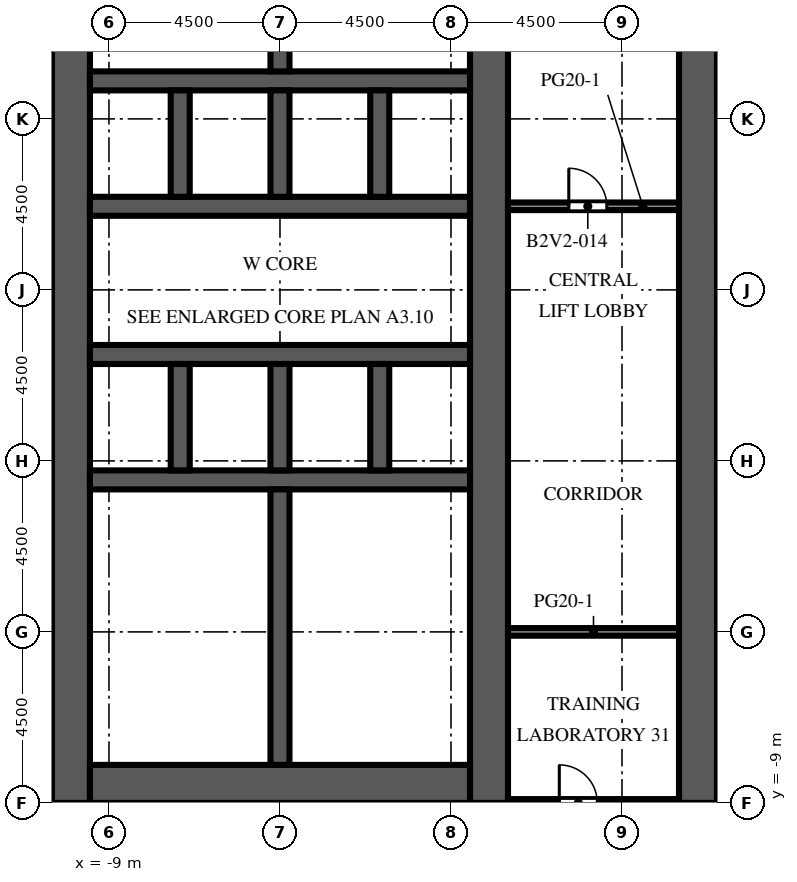
"""IFC4 building model, lengths in metres.
Left out: names, types, materials, properties, quantities, classifications, styles, units other than length and angle.
Written with IfcOpenShell. Run it as: python <this file> out.ifc"""

import sys

from ifc_helpers import new_model, si_unit, direction, frame, frame_2d, origin, place, context, subcontext, project, spatial, rectangle, extrude, element, fill, save


model = new_model("IFC4")
c1 = context("Model", 3, precision=1e-05, world=origin(), true_north=direction((0.0, 1.0)))
c2 = subcontext(c1, "Body", "Model", "MODEL_VIEW")
j1 = project(units=[si_unit("LENGTHUNIT", "METRE"), si_unit("PLANEANGLEUNIT", "RADIAN")], contexts=[c1])
p1 = place(None, origin())
s1 = spatial("IfcSite", under=j1, at=p1, CompositionType="ELEMENT")
p2 = place(p1, origin())
s2 = spatial("IfcBuilding", under=s1, at=p2, CompositionType="ELEMENT")
p3 = place(p2, frame((0.0, 0.0, 62.4)))
s3 = spatial("IfcBuildingStorey", under=s2, at=p3, CompositionType="ELEMENT", Elevation=62.4)
p4 = place(p3, frame((-10.0, -9.0, 0.0), z_axis=(0.0, 0.0, 1.0), x_axis=(0.0, 1.0, 0.0)))
e1 = element("IfcWall", 1, at=p4, inside=s3, PredefinedType="SHEAR", context=c2, shape_type="SweptSolid", body=[
    extrude(rectangle(XDim=27.5, YDim=1.0, at=frame_2d((13.75, 0.0))), origin(), (0.0, 0.0, 1.0), 4.1),
])
p5 = place(p4, frame((12.55, 0.0, 0.0)))
e2 = element("IfcOpeningElement", 2, at=p5, cuts=e1, PredefinedType="OPENING", context=c2, shape_type="SweptSolid", body=[
    extrude(rectangle(XDim=2.4, YDim=2.4, at=frame_2d((1.2, 1.2))), frame((0.0, 0.51, 0.0), z_axis=(0.0, -1.0, 0.0), x_axis=(1.0, 0.0, 0.0)), (0.0, 0.0, 1.0), 1.02),
])
p6 = place(p4, frame((6.825, 0.0, 0.0)))
e3 = element("IfcOpeningElement", 3, at=p6, cuts=e1, PredefinedType="OPENING", context=c2, shape_type="SweptSolid", body=[
    extrude(rectangle(XDim=1.2, YDim=2.1, at=frame_2d((0.6, 1.05))), frame((0.0, 0.51, 0.0), z_axis=(0.0, -1.0, 0.0), x_axis=(1.0, 0.0, 0.0)), (0.0, 0.0, 1.0), 1.02),
])
p7 = place(p4, frame((19.475, 0.0, 0.0)))
e4 = element("IfcOpeningElement", 4, at=p7, cuts=e1, PredefinedType="OPENING", context=c2, shape_type="SweptSolid", body=[
    extrude(rectangle(XDim=1.2, YDim=2.1, at=frame_2d((0.6, 1.05))), frame((0.0, 0.51, 0.0), z_axis=(0.0, -1.0, 0.0), x_axis=(1.0, 0.0, 0.0)), (0.0, 0.0, 1.0), 1.02),
])
p8 = place(p3, frame((1.0, -9.0, 0.0), z_axis=(0.0, 0.0, 1.0), x_axis=(0.0, 1.0, 0.0)))
e5 = element("IfcWall", 5, at=p8, inside=s3, PredefinedType="SHEAR", context=c2, shape_type="SweptSolid", body=[
    extrude(rectangle(XDim=27.5, YDim=1.0, at=frame_2d((13.75, 0.0))), origin(), (0.0, 0.0, 1.0), 4.1),
])
p9 = place(p8, frame((12.55, 0.0, 0.0)))
e6 = element("IfcOpeningElement", 6, at=p9, cuts=e5, PredefinedType="OPENING", context=c2, shape_type="SweptSolid", body=[
    extrude(rectangle(XDim=2.4, YDim=2.4, at=frame_2d((1.2, 1.2))), frame((0.0, 0.51, 0.0), z_axis=(0.0, -1.0, 0.0), x_axis=(1.0, 0.0, 0.0)), (0.0, 0.0, 1.0), 1.02),
])
p10 = place(p8, frame((5.55, 0.0, 0.0)))
e7 = element("IfcOpeningElement", 7, at=p10, cuts=e5, PredefinedType="OPENING", context=c2, shape_type="SweptSolid", body=[
    extrude(rectangle(XDim=0.905, YDim=2.1, at=frame_2d((0.453, 1.05))), frame((0.0, 0.51, 0.0), z_axis=(0.0, -1.0, 0.0), x_axis=(1.0, 0.0, 0.0)), (0.0, 0.0, 1.0), 1.02),
])
p11 = place(p8, frame((23.363, 0.0, 0.0)))
e8 = element("IfcOpeningElement", 8, at=p11, cuts=e5, PredefinedType="OPENING", context=c2, shape_type="SweptSolid", body=[
    extrude(rectangle(XDim=1.2, YDim=2.1, at=frame_2d((0.6, 1.05))), frame((0.0, 0.51, 0.0), z_axis=(0.0, -1.0, 0.0), x_axis=(1.0, 0.0, 0.0)), (0.0, 0.0, 1.0), 1.02),
])
p12 = place(p3, frame((-9.5, -8.5, 0.0), z_axis=(0.0, 0.0, 1.0), x_axis=(1.0, 0.0, 0.0)))
e9 = element("IfcWall", 9, at=p12, inside=s3, PredefinedType="SHEAR", context=c2, shape_type="SweptSolid", body=[
    extrude(rectangle(XDim=10.0, YDim=1.0, at=frame_2d((5.0, 0.0))), origin(), (0.0, 0.0, 1.0), 4.1),
])
p13 = place(p3, frame((-9.5, -0.5, 0.0), z_axis=(0.0, 0.0, 1.0), x_axis=(1.0, 0.0, 0.0)))
e10 = element("IfcWall", 10, at=p13, inside=s3, PredefinedType="SHEAR", context=c2, shape_type="SweptSolid", body=[
    extrude(rectangle(XDim=10.0, YDim=0.5, at=frame_2d((5.0, 0.0))), origin(), (0.0, 0.0, 1.0), 4.1),
])
p14 = place(p3, frame((-9.5, 2.8, 0.0), z_axis=(0.0, 0.0, 1.0), x_axis=(1.0, 0.0, 0.0)))
e11 = element("IfcWall", 11, at=p14, inside=s3, PredefinedType="SHEAR", context=c2, shape_type="SweptSolid", body=[
    extrude(rectangle(XDim=10.0, YDim=0.5, at=frame_2d((5.0, 0.0))), origin(), (0.0, 0.0, 1.0), 4.1),
])
p15 = place(p14, frame((0.512, 0.0, 0.0)))
e12 = element("IfcOpeningElement", 12, at=p15, cuts=e11, PredefinedType="OPENING", context=c2, shape_type="SweptSolid", body=[
    extrude(rectangle(XDim=1.1, YDim=2.1, at=frame_2d((0.55, 1.05))), frame((0.0, 0.26, 0.0), z_axis=(0.0, -1.0, 0.0), x_axis=(1.0, 0.0, 0.0)), (0.0, 0.0, 1.0), 0.52),
])
p16 = place(p14, frame((3.137, 0.0, 0.0)))
e13 = element("IfcOpeningElement", 13, at=p16, cuts=e11, PredefinedType="OPENING", context=c2, shape_type="SweptSolid", body=[
    extrude(rectangle(XDim=1.1, YDim=2.1, at=frame_2d((0.55, 1.05))), frame((0.0, 0.26, 0.0), z_axis=(0.0, -1.0, 0.0), x_axis=(1.0, 0.0, 0.0)), (0.0, 0.0, 1.0), 0.52),
])
p17 = place(p14, frame((8.387, 0.0, 0.0)))
e14 = element("IfcOpeningElement", 14, at=p17, cuts=e11, PredefinedType="OPENING", context=c2, shape_type="SweptSolid", body=[
    extrude(rectangle(XDim=1.1, YDim=2.1, at=frame_2d((0.55, 1.05))), frame((0.0, 0.26, 0.0), z_axis=(0.0, -1.0, 0.0), x_axis=(1.0, 0.0, 0.0)), (0.0, 0.0, 1.0), 0.52),
])
p18 = place(p3, frame((-9.5, 6.7, 0.0), z_axis=(0.0, 0.0, 1.0), x_axis=(1.0, 0.0, 0.0)))
e15 = element("IfcWall", 15, at=p18, inside=s3, PredefinedType="SHEAR", context=c2, shape_type="SweptSolid", body=[
    extrude(rectangle(XDim=10.0, YDim=0.5, at=frame_2d((5.0, 0.0))), origin(), (0.0, 0.0, 1.0), 4.1),
])
p19 = place(p18, frame((0.512, 0.0, 0.0)))
e16 = element("IfcOpeningElement", 16, at=p19, cuts=e15, PredefinedType="OPENING", context=c2, shape_type="SweptSolid", body=[
    extrude(rectangle(XDim=1.1, YDim=2.1, at=frame_2d((0.55, 1.05))), frame((0.0, 0.26, 0.0), z_axis=(0.0, -1.0, 0.0), x_axis=(1.0, 0.0, 0.0)), (0.0, 0.0, 1.0), 0.52),
])
p20 = place(p18, frame((3.188, 0.0, 0.0)))
e17 = element("IfcOpeningElement", 17, at=p20, cuts=e15, PredefinedType="OPENING", context=c2, shape_type="SweptSolid", body=[
    extrude(rectangle(XDim=1.0, YDim=2.1, at=frame_2d((0.5, 1.05))), frame((0.0, 0.26, 0.0), z_axis=(0.0, -1.0, 0.0), x_axis=(1.0, 0.0, 0.0)), (0.0, 0.0, 1.0), 0.52),
])
p21 = place(p18, frame((5.812, 0.0, 0.0)))
e18 = element("IfcOpeningElement", 18, at=p21, cuts=e15, PredefinedType="OPENING", context=c2, shape_type="SweptSolid", body=[
    extrude(rectangle(XDim=1.0, YDim=2.1, at=frame_2d((0.5, 1.05))), frame((0.0, 0.26, 0.0), z_axis=(0.0, -1.0, 0.0), x_axis=(1.0, 0.0, 0.0)), (0.0, 0.0, 1.0), 0.52),
])
p22 = place(p18, frame((8.438, 0.0, 0.0)))
e19 = element("IfcOpeningElement", 19, at=p22, cuts=e15, PredefinedType="OPENING", context=c2, shape_type="SweptSolid", body=[
    extrude(rectangle(XDim=1.0, YDim=2.1, at=frame_2d((0.5, 1.05))), frame((0.0, 0.26, 0.0), z_axis=(0.0, -1.0, 0.0), x_axis=(1.0, 0.0, 0.0)), (0.0, 0.0, 1.0), 0.52),
])
p23 = place(p3, frame((-9.5, 10.0, 0.0), z_axis=(0.0, 0.0, 1.0), x_axis=(1.0, 0.0, 0.0)))
e20 = element("IfcWall", 20, at=p23, inside=s3, PredefinedType="SHEAR", context=c2, shape_type="SweptSolid", body=[
    extrude(rectangle(XDim=10.0, YDim=0.5, at=frame_2d((5.0, 0.0))), origin(), (0.0, 0.0, 1.0), 4.1),
])
for number, where, z_axis, x_axis in (
    (21, (-7.125, -0.25, 0.0), (0.0, 0.0, 1.0), (0.0, 1.0, 0.0)),
    (22, (-7.125, 6.95, 0.0), (0.0, 0.0, 1.0), (0.0, 1.0, 0.0)),
    (23, (-4.5, -0.25, 0.0), (0.0, 0.0, 1.0), (0.0, 1.0, 0.0)),
    (24, (-4.5, 6.95, 0.0), (0.0, 0.0, 1.0), (0.0, 1.0, 0.0)),
    (25, (-1.875, -0.25, 0.0), (0.0, 0.0, 1.0), (0.0, 1.0, 0.0)),
    (26, (-1.875, 6.95, 0.0), (0.0, 0.0, 1.0), (0.0, 1.0, 0.0)),
):
    element("IfcWall", number, at=place(p3, frame(where, z_axis=z_axis, x_axis=x_axis)), inside=s3, PredefinedType="SHEAR", context=c2, shape_type="SweptSolid", body=[
        extrude(rectangle(XDim=2.8, YDim=0.5, at=frame_2d((1.4, 0.0))), origin(), (0.0, 0.0, 1.0), 4.1),
    ])
for number, where, z_axis, x_axis in (
    (27, (-4.5, -8.0, 0.0), (0.0, 0.0, 1.0), (0.0, 1.0, 0.0)),
    (28, (-4.5, 10.25, 0.0), (0.0, 0.0, 1.0), (0.0, 1.0, 0.0)),
):
    element("IfcWall", number, at=place(p3, frame(where, z_axis=z_axis, x_axis=x_axis)), inside=s3, PredefinedType="SHEAR", context=c2, shape_type="SweptSolid", body=[
        extrude(rectangle(XDim=7.25, YDim=0.5, at=frame_2d((3.625, 0.0))), origin(), (0.0, 0.0, 1.0), 4.1),
    ])
p24 = place(p3, frame((6.5, -9.0, 0.0), z_axis=(0.0, 0.0, 1.0), x_axis=(0.0, 1.0, 0.0)))
e29 = element("IfcWall", 29, at=p24, inside=s3, PredefinedType="SHEAR", context=c2, shape_type="SweptSolid", body=[
    extrude(rectangle(XDim=27.5, YDim=1.0, at=frame_2d((13.75, 0.0))), origin(), (0.0, 0.0, 1.0), 4.1),
])
p25 = place(p24, frame((12.55, 0.0, 0.0)))
e30 = element("IfcOpeningElement", 30, at=p25, cuts=e29, PredefinedType="OPENING", context=c2, shape_type="SweptSolid", body=[
    extrude(rectangle(XDim=2.4, YDim=2.4, at=frame_2d((1.2, 1.2))), frame((0.0, 0.51, 0.0), z_axis=(0.0, -1.0, 0.0), x_axis=(1.0, 0.0, 0.0)), (0.0, 0.0, 1.0), 1.02),
])
p26 = place(p24, frame((5.55, 0.0, 0.0)))
e31 = element("IfcOpeningElement", 31, at=p26, cuts=e29, PredefinedType="OPENING", context=c2, shape_type="SweptSolid", body=[
    extrude(rectangle(XDim=0.905, YDim=2.1, at=frame_2d((0.453, 1.05))), frame((0.0, 0.51, 0.0), z_axis=(0.0, -1.0, 0.0), x_axis=(1.0, 0.0, 0.0)), (0.0, 0.0, 1.0), 1.02),
])
p27 = place(p24, frame((23.363, 0.0, 0.0)))
e32 = element("IfcOpeningElement", 32, at=p27, cuts=e29, PredefinedType="OPENING", context=c2, shape_type="SweptSolid", body=[
    extrude(rectangle(XDim=1.2, YDim=2.1, at=frame_2d((0.6, 1.05))), frame((0.0, 0.51, 0.0), z_axis=(0.0, -1.0, 0.0), x_axis=(1.0, 0.0, 0.0)), (0.0, 0.0, 1.0), 1.02),
])
p28 = place(p3, frame((-1.875, -3.65, 0.0), z_axis=(0.0, 0.0, 1.0), x_axis=(1.0, 0.0, 0.0)))
e33 = element("IfcWall", 33, at=p28, inside=s3, PredefinedType="PARTITIONING", context=c2, shape_type="SweptSolid", body=[
    extrude(rectangle(XDim=2.375, YDim=0.1, at=frame_2d((1.188, 0.0))), origin(), (0.0, 0.0, 1.0), 3.65),
])
p29 = place(p28, frame((0.688, 0.0, 0.0)))
e34 = element("IfcOpeningElement", 34, at=p29, cuts=e33, PredefinedType="OPENING", context=c2, shape_type="SweptSolid", body=[
    extrude(rectangle(XDim=1.0, YDim=2.1, at=frame_2d((0.5, 1.05))), frame((0.0, 0.06, 0.0), z_axis=(0.0, -1.0, 0.0), x_axis=(1.0, 0.0, 0.0)), (0.0, 0.0, 1.0), 0.12),
])
p30 = place(p3, frame((-4.25, -3.65, 0.0), z_axis=(0.0, 0.0, 1.0), x_axis=(1.0, 0.0, 0.0)))
e35 = element("IfcWall", 35, at=p30, inside=s3, PredefinedType="PARTITIONING", context=c2, shape_type="SweptSolid", body=[
    extrude(rectangle(XDim=2.375, YDim=0.1, at=frame_2d((1.188, 0.0))), origin(), (0.0, 0.0, 1.0), 3.65),
])
p31 = place(p30, frame((0.688, 0.0, 0.0)))
e36 = element("IfcOpeningElement", 36, at=p31, cuts=e35, PredefinedType="OPENING", context=c2, shape_type="SweptSolid", body=[
    extrude(rectangle(XDim=1.0, YDim=2.1, at=frame_2d((0.5, 1.05))), frame((0.0, 0.06, 0.0), z_axis=(0.0, -1.0, 0.0), x_axis=(1.0, 0.0, 0.0)), (0.0, 0.0, 1.0), 0.12),
])
p32 = place(p3, frame((-1.875, -2.345, 0.0), z_axis=(0.0, 0.0, 1.0), x_axis=(1.0, 0.0, 0.0)))
e37 = element("IfcWall", 37, at=p32, inside=s3, PredefinedType="PARTITIONING", context=c2, shape_type="SweptSolid", body=[
    extrude(rectangle(XDim=2.375, YDim=0.1, at=frame_2d((1.188, 0.0))), origin(), (0.0, 0.0, 1.0), 3.65),
])
p33 = place(p32, frame((0.688, 0.0, 0.0)))
e38 = element("IfcOpeningElement", 38, at=p33, cuts=e37, PredefinedType="OPENING", context=c2, shape_type="SweptSolid", body=[
    extrude(rectangle(XDim=1.0, YDim=2.1, at=frame_2d((0.5, 1.05))), frame((0.0, 0.06, 0.0), z_axis=(0.0, -1.0, 0.0), x_axis=(1.0, 0.0, 0.0)), (0.0, 0.0, 1.0), 0.12),
])
p34 = place(p3, frame((-4.25, -2.345, 0.0), z_axis=(0.0, 0.0, 1.0), x_axis=(1.0, 0.0, 0.0)))
e39 = element("IfcWall", 39, at=p34, inside=s3, PredefinedType="PARTITIONING", context=c2, shape_type="SweptSolid", body=[
    extrude(rectangle(XDim=2.375, YDim=0.1, at=frame_2d((1.188, 0.0))), origin(), (0.0, 0.0, 1.0), 3.65),
])
p35 = place(p34, frame((0.688, 0.0, 0.0)))
e40 = element("IfcOpeningElement", 40, at=p35, cuts=e39, PredefinedType="OPENING", context=c2, shape_type="SweptSolid", body=[
    extrude(rectangle(XDim=1.0, YDim=2.1, at=frame_2d((0.5, 1.05))), frame((0.0, 0.06, 0.0), z_axis=(0.0, -1.0, 0.0), x_axis=(1.0, 0.0, 0.0)), (0.0, 0.0, 1.0), 0.12),
])
p36 = place(p3, frame((-1.875, -8.0, 0.0), z_axis=(0.0, 0.0, 1.0), x_axis=(0.0, 1.0, 0.0)))
e41 = element("IfcWall", 41, at=p36, inside=s3, PredefinedType="PARTITIONING", context=c2, shape_type="SweptSolid", body=[
    extrude(rectangle(XDim=4.35, YDim=0.1, at=frame_2d((2.175, 0.0))), origin(), (0.0, 0.0, 1.0), 3.65),
])
p37 = place(p3, frame((-1.875, -2.345, 0.0), z_axis=(0.0, 0.0, 1.0), x_axis=(0.0, 1.0, 0.0)))
e42 = element("IfcWall", 42, at=p37, inside=s3, PredefinedType="PARTITIONING", context=c2, shape_type="SweptSolid", body=[
    extrude(rectangle(XDim=1.595, YDim=0.1, at=frame_2d((0.797, 0.0))), origin(), (0.0, 0.0, 1.0), 3.65),
])
p38 = place(p3, frame((1.5, -9.0, 0.0), z_axis=(0.0, 0.0, 1.0), x_axis=(1.0, 0.0, 0.0)))
e43 = element("IfcWall", 43, at=p38, inside=s3, PredefinedType="PARTITIONING", context=c2, shape_type="SweptSolid", body=[
    extrude(rectangle(XDim=4.5, YDim=0.2, at=frame_2d((2.25, 0.0))), origin(), (0.0, 0.0, 1.0), 3.65),
])
p39 = place(p38, frame((1.35, 0.0, 0.0)))
e44 = element("IfcOpeningElement", 44, at=p39, cuts=e43, PredefinedType="OPENING", context=c2, shape_type="SweptSolid", body=[
    extrude(rectangle(XDim=1.0, YDim=2.1, at=frame_2d((0.5, 1.05))), frame((0.0, 0.11, 0.0), z_axis=(0.0, -1.0, 0.0), x_axis=(1.0, 0.0, 0.0)), (0.0, 0.0, 1.0), 0.22),
])
p40 = place(p3, frame((1.5, -4.5, 0.0), z_axis=(0.0, 0.0, 1.0), x_axis=(1.0, 0.0, 0.0)))
e45 = element("IfcWall", 45, at=p40, inside=s3, PredefinedType="PARTITIONING", context=c2, shape_type="SweptSolid", body=[
    extrude(rectangle(XDim=4.5, YDim=0.2, at=frame_2d((2.25, 0.0))), origin(), (0.0, 0.0, 1.0), 3.65),
])
p41 = place(p3, frame((1.5, 6.7, 0.0), z_axis=(0.0, 0.0, 1.0), x_axis=(1.0, 0.0, 0.0)))
e46 = element("IfcWall", 46, at=p41, inside=s3, PredefinedType="PARTITIONING", context=c2, shape_type="SweptSolid", body=[
    extrude(rectangle(XDim=4.5, YDim=0.2, at=frame_2d((2.25, 0.0))), origin(), (0.0, 0.0, 1.0), 3.65),
])
p42 = place(p41, frame((1.6, 0.0, 0.0)))
e47 = element("IfcOpeningElement", 47, at=p42, cuts=e46, PredefinedType="OPENING", context=c2, shape_type="SweptSolid", body=[
    extrude(rectangle(XDim=1.0, YDim=2.1, at=frame_2d((0.5, 1.05))), frame((0.0, 0.11, 0.0), z_axis=(0.0, -1.0, 0.0), x_axis=(1.0, 0.0, 0.0)), (0.0, 0.0, 1.0), 0.22),
])
p43 = place(p15, origin())
e48 = element("IfcDoor", 48, at=p43, inside=s3, OperationType="DOUBLE_DOOR_SLIDING", PredefinedType="DOOR", context=c2, shape_type="SweptSolid", body=[
    extrude(rectangle(XDim=1.1, YDim=2.1, at=frame_2d((0.55, 1.05))), frame((0.0, 0.025, 0.0), z_axis=(0.0, -1.0, 0.0), x_axis=(1.0, 0.0, 0.0)), (0.0, 0.0, 1.0), 0.05),
])
fill(e12, e48)
p44 = place(p16, origin())
e49 = element("IfcDoor", 49, at=p44, inside=s3, OperationType="DOUBLE_DOOR_SLIDING", PredefinedType="DOOR", context=c2, shape_type="SweptSolid", body=[
    extrude(rectangle(XDim=1.1, YDim=2.1, at=frame_2d((0.55, 1.05))), frame((0.0, 0.025, 0.0), z_axis=(0.0, -1.0, 0.0), x_axis=(1.0, 0.0, 0.0)), (0.0, 0.0, 1.0), 0.05),
])
fill(e13, e49)
p45 = place(p17, origin())
e50 = element("IfcDoor", 50, at=p45, inside=s3, OperationType="DOUBLE_DOOR_SLIDING", PredefinedType="DOOR", context=c2, shape_type="SweptSolid", body=[
    extrude(rectangle(XDim=1.1, YDim=2.1, at=frame_2d((0.55, 1.05))), frame((0.0, 0.025, 0.0), z_axis=(0.0, -1.0, 0.0), x_axis=(1.0, 0.0, 0.0)), (0.0, 0.0, 1.0), 0.05),
])
fill(e14, e50)
p46 = place(p19, origin())
e51 = element("IfcDoor", 51, at=p46, inside=s3, OperationType="DOUBLE_DOOR_SLIDING", PredefinedType="DOOR", context=c2, shape_type="SweptSolid", body=[
    extrude(rectangle(XDim=1.1, YDim=2.1, at=frame_2d((0.55, 1.05))), frame((0.0, 0.025, 0.0), z_axis=(0.0, -1.0, 0.0), x_axis=(1.0, 0.0, 0.0)), (0.0, 0.0, 1.0), 0.05),
])
fill(e16, e51)
p47 = place(p5, origin())
e52 = element("IfcDoor", 52, at=p47, inside=s3, OperationType="DOUBLE_DOOR_DOUBLE_SWING", PredefinedType="DOOR", context=c2, shape_type="SweptSolid", body=[
    extrude(rectangle(XDim=2.4, YDim=2.4, at=frame_2d((1.2, 1.2))), frame((0.0, 0.025, 0.0), z_axis=(0.0, -1.0, 0.0), x_axis=(1.0, 0.0, 0.0)), (0.0, 0.0, 1.0), 0.05),
])
fill(e2, e52)
p48 = place(p9, origin())
e53 = element("IfcDoor", 53, at=p48, inside=s3, OperationType="DOUBLE_DOOR_DOUBLE_SWING", PredefinedType="DOOR", context=c2, shape_type="SweptSolid", body=[
    extrude(rectangle(XDim=2.4, YDim=2.4, at=frame_2d((1.2, 1.2))), frame((0.0, 0.025, 0.0), z_axis=(0.0, -1.0, 0.0), x_axis=(1.0, 0.0, 0.0)), (0.0, 0.0, 1.0), 0.05),
])
fill(e6, e53)
p49 = place(p25, origin())
e54 = element("IfcDoor", 54, at=p49, inside=s3, OperationType="DOUBLE_DOOR_DOUBLE_SWING", PredefinedType="DOOR", context=c2, shape_type="SweptSolid", body=[
    extrude(rectangle(XDim=2.4, YDim=2.4, at=frame_2d((1.2, 1.2))), frame((0.0, 0.025, 0.0), z_axis=(0.0, -1.0, 0.0), x_axis=(1.0, 0.0, 0.0)), (0.0, 0.0, 1.0), 0.05),
])
fill(e30, e54)
p50 = place(p6, origin())
e55 = element("IfcDoor", 55, at=p50, inside=s3, OperationType="SINGLE_SWING_LEFT", PredefinedType="DOOR", context=c2, shape_type="SweptSolid", body=[
    extrude(rectangle(XDim=1.2, YDim=2.1, at=frame_2d((0.6, 1.05))), frame((0.0, 0.025, 0.0), z_axis=(0.0, -1.0, 0.0), x_axis=(1.0, 0.0, 0.0)), (0.0, 0.0, 1.0), 0.05),
])
fill(e3, e55)
p51 = place(p7, origin())
e56 = element("IfcDoor", 56, at=p51, inside=s3, OperationType="SINGLE_SWING_LEFT", PredefinedType="DOOR", context=c2, shape_type="SweptSolid", body=[
    extrude(rectangle(XDim=1.2, YDim=2.1, at=frame_2d((0.6, 1.05))), frame((0.0, 0.025, 0.0), z_axis=(0.0, -1.0, 0.0), x_axis=(1.0, 0.0, 0.0)), (0.0, 0.0, 1.0), 0.05),
])
fill(e4, e56)
p52 = place(p20, origin())
e57 = element("IfcDoor", 57, at=p52, inside=s3, OperationType="SINGLE_SWING_RIGHT", PredefinedType="DOOR", context=c2, shape_type="SweptSolid", body=[
    extrude(rectangle(XDim=1.0, YDim=2.1, at=frame_2d((0.5, 1.05))), frame((0.0, 0.025, 0.0), z_axis=(0.0, -1.0, 0.0), x_axis=(1.0, 0.0, 0.0)), (0.0, 0.0, 1.0), 0.05),
])
fill(e17, e57)
p53 = place(p21, origin())
e58 = element("IfcDoor", 58, at=p53, inside=s3, OperationType="SINGLE_SWING_LEFT", PredefinedType="DOOR", context=c2, shape_type="SweptSolid", body=[
    extrude(rectangle(XDim=1.0, YDim=2.1, at=frame_2d((0.5, 1.05))), frame((0.0, 0.025, 0.0), z_axis=(0.0, -1.0, 0.0), x_axis=(1.0, 0.0, 0.0)), (0.0, 0.0, 1.0), 0.05),
])
fill(e18, e58)
p54 = place(p22, origin())
e59 = element("IfcDoor", 59, at=p54, inside=s3, OperationType="SINGLE_SWING_RIGHT", PredefinedType="DOOR", context=c2, shape_type="SweptSolid", body=[
    extrude(rectangle(XDim=1.0, YDim=2.1, at=frame_2d((0.5, 1.05))), frame((0.0, 0.025, 0.0), z_axis=(0.0, -1.0, 0.0), x_axis=(1.0, 0.0, 0.0)), (0.0, 0.0, 1.0), 0.05),
])
fill(e19, e59)
p55 = place(p10, origin())
e60 = element("IfcDoor", 60, at=p55, inside=s3, OperationType="SINGLE_SWING_LEFT", PredefinedType="DOOR", context=c2, shape_type="SweptSolid", body=[
    extrude(rectangle(XDim=0.905, YDim=2.1, at=frame_2d((0.453, 1.05))), frame((0.0, 0.475, 0.0), z_axis=(0.0, -1.0, 0.0), x_axis=(1.0, 0.0, 0.0)), (0.0, 0.0, 1.0), 0.05),
])
fill(e7, e60)
p56 = place(p29, origin())
e61 = element("IfcDoor", 61, at=p56, inside=s3, OperationType="SINGLE_SWING_RIGHT", PredefinedType="DOOR", context=c2, shape_type="SweptSolid", body=[
    extrude(rectangle(XDim=1.0, YDim=2.1, at=frame_2d((0.5, 1.05))), frame((0.0, 0.025, 0.0), z_axis=(0.0, -1.0, 0.0), x_axis=(1.0, 0.0, 0.0)), (0.0, 0.0, 1.0), 0.05),
])
fill(e34, e61)
p57 = place(p31, origin())
e62 = element("IfcDoor", 62, at=p57, inside=s3, OperationType="SINGLE_SWING_LEFT", PredefinedType="DOOR", context=c2, shape_type="SweptSolid", body=[
    extrude(rectangle(XDim=1.0, YDim=2.1, at=frame_2d((0.5, 1.05))), frame((0.0, 0.025, 0.0), z_axis=(0.0, -1.0, 0.0), x_axis=(1.0, 0.0, 0.0)), (0.0, 0.0, 1.0), 0.05),
])
fill(e36, e62)
p58 = place(p33, origin())
e63 = element("IfcDoor", 63, at=p58, inside=s3, OperationType="SINGLE_SWING_RIGHT", PredefinedType="DOOR", context=c2, shape_type="SweptSolid", body=[
    extrude(rectangle(XDim=1.0, YDim=2.1, at=frame_2d((0.5, 1.05))), frame((0.0, 0.025, 0.0), z_axis=(0.0, -1.0, 0.0), x_axis=(1.0, 0.0, 0.0)), (0.0, 0.0, 1.0), 0.05),
])
fill(e38, e63)
p59 = place(p35, origin())
e64 = element("IfcDoor", 64, at=p59, inside=s3, OperationType="SINGLE_SWING_LEFT", PredefinedType="DOOR", context=c2, shape_type="SweptSolid", body=[
    extrude(rectangle(XDim=1.0, YDim=2.1, at=frame_2d((0.5, 1.05))), frame((0.0, 0.025, 0.0), z_axis=(0.0, -1.0, 0.0), x_axis=(1.0, 0.0, 0.0)), (0.0, 0.0, 1.0), 0.05),
])
fill(e40, e64)
p60 = place(p26, origin())
e65 = element("IfcDoor", 65, at=p60, inside=s3, OperationType="SINGLE_SWING_RIGHT", PredefinedType="DOOR", context=c2, shape_type="SweptSolid", body=[
    extrude(rectangle(XDim=0.905, YDim=2.1, at=frame_2d((0.453, 1.05))), frame((0.0, -0.425, 0.0), z_axis=(0.0, -1.0, 0.0), x_axis=(1.0, 0.0, 0.0)), (0.0, 0.0, 1.0), 0.05),
])
fill(e31, e65)
p61 = place(p39, origin())
e66 = element("IfcDoor", 66, at=p61, inside=s3, OperationType="SINGLE_SWING_LEFT", PredefinedType="DOOR", context=c2, shape_type="SweptSolid", body=[
    extrude(rectangle(XDim=1.0, YDim=2.1, at=frame_2d((0.5, 1.05))), frame((0.0, 0.025, 0.0), z_axis=(0.0, -1.0, 0.0), x_axis=(1.0, 0.0, 0.0)), (0.0, 0.0, 1.0), 0.05),
])
fill(e44, e66)
p62 = place(p42, origin())
e67 = element("IfcDoor", 67, at=p62, inside=s3, OperationType="SINGLE_SWING_LEFT", PredefinedType="DOOR", context=c2, shape_type="SweptSolid", body=[
    extrude(rectangle(XDim=1.0, YDim=2.1, at=frame_2d((0.5, 1.05))), frame((0.0, 0.025, 0.0), z_axis=(0.0, -1.0, 0.0), x_axis=(1.0, 0.0, 0.0)), (0.0, 0.0, 1.0), 0.05),
])
fill(e47, e67)
save(model, sys.argv[1])
